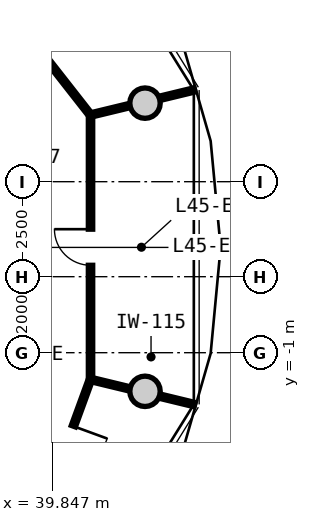
"""IFC4 building model, lengths in metres.
Left out: names, types, materials, properties, quantities, classifications, styles, units other than length and angle.
Written with IfcOpenShell. Run it as: python <this file> out.ifc"""

import sys

from ifc_helpers import new_model, si_unit, direction, frame, frame_2d, origin, origin_2d, place, context, subcontext, project, spatial, rectangle, circle, extrude, source, transform, mapped, element, fill, save


model = new_model("IFC4")
c1 = context("Model", 3, precision=1e-05, world=origin(), true_north=direction((0.0, 1.0)))
c2 = subcontext(c1, "Body", "Model", "MODEL_VIEW")
j1 = project(units=[si_unit("LENGTHUNIT", "METRE"), si_unit("PLANEANGLEUNIT", "RADIAN")], contexts=[c1])
p1 = place(None, origin())
s1 = spatial("IfcSite", under=j1, at=p1, CompositionType="ELEMENT")
p2 = place(p1, origin())
s2 = spatial("IfcBuilding", under=s1, at=p2, CompositionType="ELEMENT")
p3 = place(p2, frame((0.0, 0.0, 146.5)))
s3 = spatial("IfcBuildingStorey", under=s2, at=p3, CompositionType="ELEMENT", Elevation=146.5)
m1 = source(origin(), c2, "Body", "SweptSolid", [
    extrude(circle(Radius=0.4, at=origin_2d()), origin(), (0.0, 0.0, 1.0), 3.05),
])
for number, where, z_axis, x_axis in (
    (1, (42.285, 5.567, 0.0), (0.0, 0.0, 1.0), (1.0, 0.0, 0.0)),
    (2, (42.285, -2.016, 0.0), (0.0, 0.0, 1.0), (1.0, 0.0, 0.0)),
):
    element("IfcColumn", number, at=place(p3, frame(where, z_axis=z_axis, x_axis=x_axis)), inside=s3, PredefinedType="COLUMN", context=c2, shape_type="MappedRepresentation", body=[
        mapped(m1, transform((0.0, 0.0, 0.0), x_axis=(1.0, 0.0, 0.0), y_axis=(0.0, 1.0, 0.0), z_axis=(0.0, 0.0, 1.0), scale=1.0)),
    ])
m2 = source(origin(), c2, "Body", "SweptSolid", [
    extrude(rectangle(XDim=6.958, YDim=0.115, at=frame_2d((3.479, 0.0))), origin(), (0.0, 0.0, 1.0), 2.795),
])
p4 = place(p3, frame((40.851, -1.703, 0.0), z_axis=(0.0, 0.0, 1.0), x_axis=(0.0, 1.0, 0.0)))
e3 = element("IfcWall", 3, at=p4, inside=s3, PredefinedType="PARTITIONING", context=c2, shape_type="MappedRepresentation", body=[
    mapped(m2, transform((0.0, 0.0, 0.0), x_axis=(1.0, 0.0, 0.0), y_axis=(0.0, 1.0, 0.0), z_axis=(0.0, 0.0, 1.0), scale=1.0)),
])
p5 = place(p4, frame((3.004, 0.0, 0.0)))
e4 = element("IfcOpeningElement", 4, at=p5, cuts=e3, PredefinedType="OPENING", context=c2, shape_type="SweptSolid", body=[
    extrude(rectangle(XDim=0.95, YDim=2.1, at=frame_2d((0.475, 1.05))), frame((0.0, 0.067, 0.0), z_axis=(0.0, -1.0, 0.0), x_axis=(1.0, 0.0, 0.0)), (0.0, 0.0, 1.0), 0.135),
])
m3 = source(origin(), c2, "Body", "SweptSolid", [
    extrude(rectangle(XDim=2.817, YDim=0.115, at=frame_2d((1.408, 0.0))), origin(), (0.0, 0.0, 1.0), 2.345),
])
p6 = place(p3, frame((40.851, -1.703, 0.0), z_axis=(0.0, 0.0, 1.0), x_axis=(0.971960052091, -0.235146033647, 0.0)))
e5 = element("IfcWall", 5, at=p6, inside=s3, PredefinedType="PARTITIONING", context=c2, shape_type="MappedRepresentation", body=[
    mapped(m3, transform((0.0, 0.0, 0.0), x_axis=(1.0, 0.0, 0.0), y_axis=(0.0, 1.0, 0.0), z_axis=(0.0, 0.0, 1.0), scale=1.0)),
])
m4 = source(origin(), c2, "Body", "SweptSolid", [
    extrude(rectangle(XDim=6.966, YDim=0.115, at=frame_2d((3.483, 0.0))), origin(), (0.0, 0.0, 1.0), 2.795),
])
p7 = place(p3, frame((40.85, 5.254, 0.0), z_axis=(0.0, 0.0, 1.0), x_axis=(-0.616695640563, 0.787201681217, 0.0)))
e6 = element("IfcWall", 6, at=p7, inside=s3, PredefinedType="PARTITIONING", context=c2, shape_type="MappedRepresentation", body=[
    mapped(m4, transform((0.0, 0.0, 0.0), x_axis=(1.0, 0.0, 0.0), y_axis=(0.0, 1.0, 0.0), z_axis=(0.0, 0.0, 1.0), scale=1.0)),
])
p8 = place(p7, frame((3.008, 0.0, 0.0)))
e7 = element("IfcOpeningElement", 7, at=p8, cuts=e6, PredefinedType="OPENING", context=c2, shape_type="SweptSolid", body=[
    extrude(rectangle(XDim=0.95, YDim=2.1, at=frame_2d((0.475, 1.05))), frame((0.0, 0.067, 0.0), z_axis=(0.0, -1.0, 0.0), x_axis=(1.0, 0.0, 0.0)), (0.0, 0.0, 1.0), 0.135),
])
m5 = source(origin(), c2, "Body", "SweptSolid", [
    extrude(rectangle(XDim=2.818, YDim=0.115, at=frame_2d((1.409, 0.0))), origin(), (0.0, 0.0, 1.0), 2.345),
])
p9 = place(p3, frame((40.85, 5.254, 0.0), z_axis=(0.0, 0.0, 1.0), x_axis=(0.971949193017, 0.235190914353, 0.0)))
e8 = element("IfcWall", 8, at=p9, inside=s3, PredefinedType="PARTITIONING", context=c2, shape_type="MappedRepresentation", body=[
    mapped(m5, transform((0.0, 0.0, 0.0), x_axis=(1.0, 0.0, 0.0), y_axis=(0.0, 1.0, 0.0), z_axis=(0.0, 0.0, 1.0), scale=1.0)),
])
m6 = source(origin(), c2, "Body", "SweptSolid", [
    extrude(rectangle(XDim=3.571, YDim=0.115, at=frame_2d((1.786, 0.0))), origin(), (0.0, 0.0, 1.0), 2.795),
])
p10 = place(p3, frame((39.623, -5.057, 0.0), z_axis=(0.0, 0.0, 1.0), x_axis=(0.343515356993, 0.939147059576, 0.0)))
e9 = element("IfcWall", 9, at=p10, inside=s3, PredefinedType="PARTITIONING", context=c2, shape_type="MappedRepresentation", body=[
    mapped(m6, transform((0.0, 0.0, 0.0), x_axis=(1.0, 0.0, 0.0), y_axis=(0.0, 1.0, 0.0), z_axis=(0.0, 0.0, 1.0), scale=1.0)),
])
p11 = place(p10, frame((1.311, 0.0, 0.0)))
e10 = element("IfcOpeningElement", 10, at=p11, cuts=e9, PredefinedType="OPENING", context=c2, shape_type="SweptSolid", body=[
    extrude(rectangle(XDim=0.95, YDim=2.1, at=frame_2d((0.475, 1.05))), frame((0.0, 0.067, 0.0), z_axis=(0.0, -1.0, 0.0), x_axis=(1.0, 0.0, 0.0)), (0.0, 0.0, 1.0), 0.135),
])
m7 = source(origin(), c2, "Body", "SweptSolid", [
    extrude(rectangle(XDim=0.95, YDim=2.1, at=frame_2d((0.475, 1.05))), frame((0.0, 0.025, 0.0), z_axis=(0.0, -1.0, 0.0), x_axis=(1.0, 0.0, 0.0)), (0.0, 0.0, 1.0), 0.05),
])
p12 = place(p11, frame((0.95, 0.0, 0.0), z_axis=(0.0, 0.0, 1.0), x_axis=(-1.0, 0.0, 0.0)))
e11 = element("IfcDoor", 11, at=p12, inside=s3, OperationType="SINGLE_SWING_LEFT", PredefinedType="DOOR", context=c2, shape_type="MappedRepresentation", body=[
    mapped(m7, transform((0.0, 0.0, 0.0), x_axis=(1.0, 0.0, 0.0), y_axis=(0.0, 1.0, 0.0), z_axis=(0.0, 0.0, 1.0), scale=1.0)),
])
fill(e10, e11)
p13 = place(p5, origin())
e12 = element("IfcDoor", 12, at=p13, inside=s3, OperationType="SINGLE_SWING_RIGHT", PredefinedType="DOOR", context=c2, shape_type="MappedRepresentation", body=[
    mapped(m7, transform((0.0, 0.0, 0.0), x_axis=(1.0, 0.0, 0.0), y_axis=(0.0, 1.0, 0.0), z_axis=(0.0, 0.0, 1.0), scale=1.0)),
])
fill(e4, e12)
save(model, sys.argv[1])
